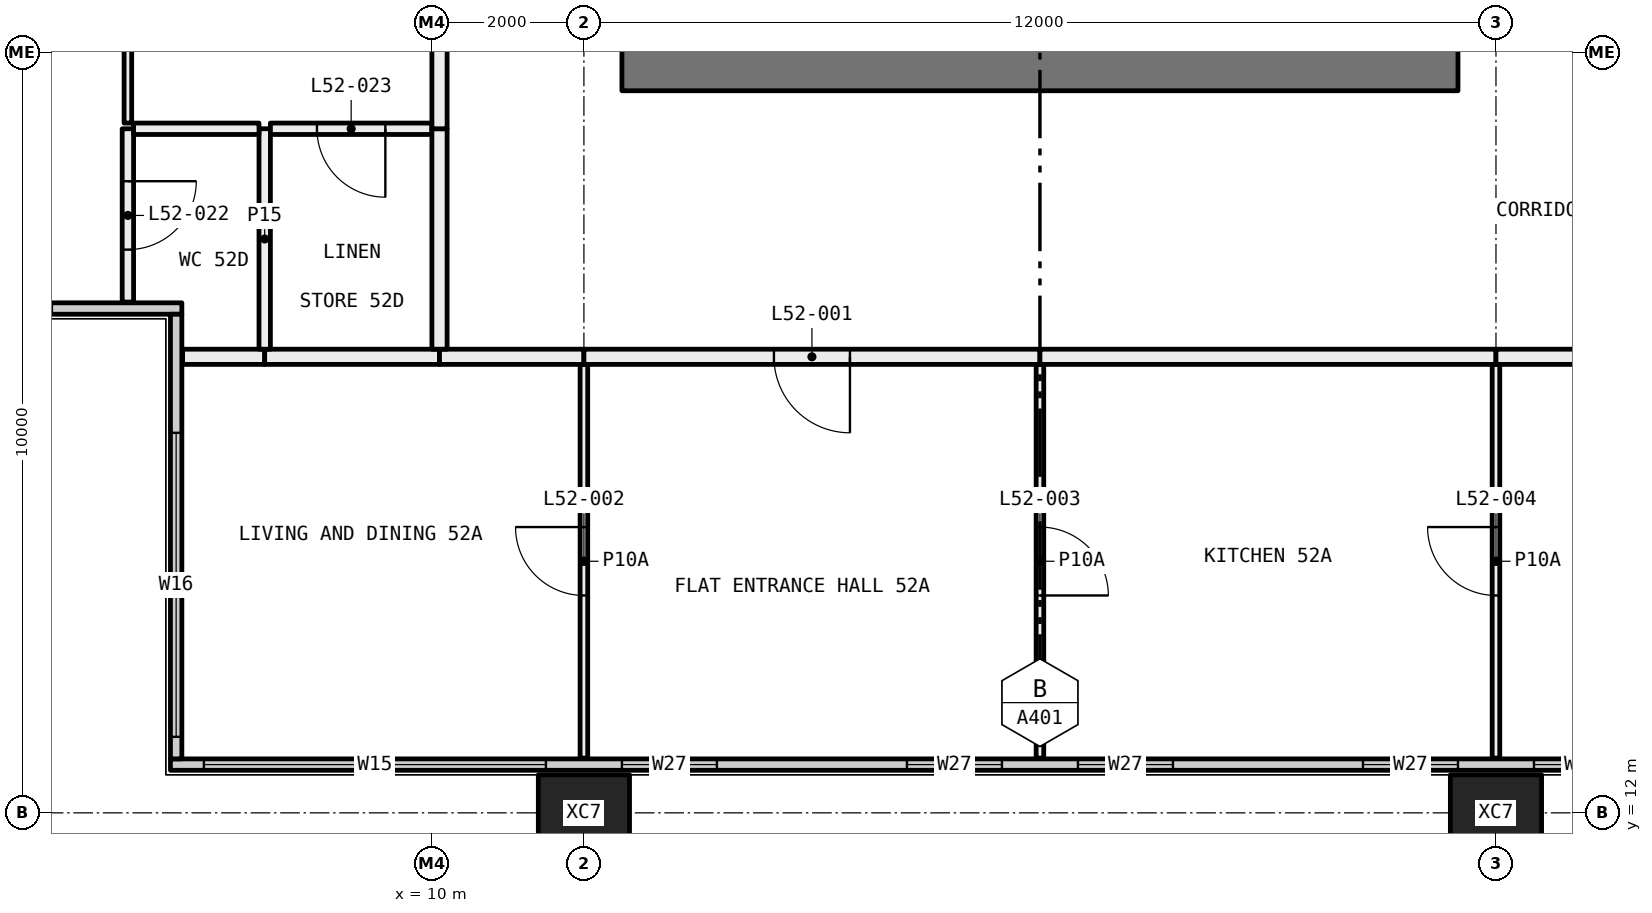
"""IFC4 building model, lengths in metres.
Left out: names, types, materials, properties, quantities, classifications, styles, units other than length and angle.
Written with IfcOpenShell. Run it as: python <this file> out.ifc"""

import sys

from ifc_helpers import new_model, si_unit, direction, frame, frame_2d, origin, origin_2d, place, context, subcontext, project, spatial, rectangle, hollow_rectangle, extrude, element, fill, save


model = new_model("IFC4")
c1 = context("Model", 3, precision=1e-05, world=origin(), true_north=direction((0.0, 1.0)))
c2 = subcontext(c1, "Body", "Model", "MODEL_VIEW")
j1 = project(units=[si_unit("LENGTHUNIT", "METRE"), si_unit("PLANEANGLEUNIT", "RADIAN")], contexts=[c1])
p1 = place(None, origin())
s1 = spatial("IfcSite", under=j1, at=p1, CompositionType="ELEMENT")
p2 = place(p1, origin())
s2 = spatial("IfcBuilding", under=s1, at=p2, CompositionType="ELEMENT")
p3 = place(p2, frame((0.0, 0.0, 196.2)))
s3 = spatial("IfcBuildingStorey", under=s2, at=p3, CompositionType="ELEMENT", Elevation=196.2)
for number, where, z_axis, x_axis in (
    (1, (12.0, 12.0, -0.4), (0.0, 0.0, 1.0), (1.0, 0.0, 0.0)),
    (2, (24.0, 12.0, -0.4), (0.0, 0.0, 1.0), (1.0, 0.0, 0.0)),
):
    element("IfcColumn", number, at=place(p3, frame(where, z_axis=z_axis, x_axis=x_axis)), inside=s3, PredefinedType="COLUMN", context=c2, shape_type="SweptSolid", body=[
        extrude(hollow_rectangle(XDim=1.2, YDim=1.0, WallThickness=0.045, at=origin_2d()), origin(), (0.0, 0.0, 1.0), 3.45),
    ])
p4 = place(p3, frame((6.56, 12.635, 0.0), z_axis=(0.0, 0.0, 1.0), x_axis=(1.0, 0.0, 0.0)))
e3 = element("IfcWall", 3, at=p4, inside=s3, PredefinedType="ELEMENTEDWALL", context=c2, shape_type="SweptSolid", body=[
    extrude(rectangle(XDim=46.88, YDim=0.15, at=frame_2d((23.44, 0.0))), origin(), (0.0, 0.0, 1.0), 3.05),
])
p5 = place(p4, frame((0.44, 0.0, 0.45)))
e4 = element("IfcOpeningElement", 4, at=p5, cuts=e3, PredefinedType="OPENING", context=c2, shape_type="SweptSolid", body=[
    extrude(rectangle(XDim=4.5, YDim=2.55, at=frame_2d((2.25, 1.275))), frame((0.0, 0.085, 0.0), z_axis=(0.0, -1.0, 0.0), x_axis=(1.0, 0.0, 0.0)), (0.0, 0.0, 1.0), 0.17),
])
p6 = place(p4, frame((5.94, 0.0, 0.45)))
e5 = element("IfcOpeningElement", 5, at=p6, cuts=e3, PredefinedType="OPENING", context=c2, shape_type="SweptSolid", body=[
    extrude(rectangle(XDim=1.25, YDim=2.55, at=frame_2d((0.625, 1.275))), frame((0.0, 0.085, 0.0), z_axis=(0.0, -1.0, 0.0), x_axis=(1.0, 0.0, 0.0)), (0.0, 0.0, 1.0), 0.17),
])
p7 = place(p4, frame((9.69, 0.0, 0.45)))
e6 = element("IfcOpeningElement", 6, at=p7, cuts=e3, PredefinedType="OPENING", context=c2, shape_type="SweptSolid", body=[
    extrude(rectangle(XDim=1.25, YDim=2.55, at=frame_2d((0.625, 1.275))), frame((0.0, 0.085, 0.0), z_axis=(0.0, -1.0, 0.0), x_axis=(1.0, 0.0, 0.0)), (0.0, 0.0, 1.0), 0.17),
])
p8 = place(p4, frame((11.94, 0.0, 0.45)))
e7 = element("IfcOpeningElement", 7, at=p8, cuts=e3, PredefinedType="OPENING", context=c2, shape_type="SweptSolid", body=[
    extrude(rectangle(XDim=1.25, YDim=2.55, at=frame_2d((0.625, 1.275))), frame((0.0, 0.085, 0.0), z_axis=(0.0, -1.0, 0.0), x_axis=(1.0, 0.0, 0.0)), (0.0, 0.0, 1.0), 0.17),
])
p9 = place(p4, frame((15.69, 0.0, 0.45)))
e8 = element("IfcOpeningElement", 8, at=p9, cuts=e3, PredefinedType="OPENING", context=c2, shape_type="SweptSolid", body=[
    extrude(rectangle(XDim=1.25, YDim=2.55, at=frame_2d((0.625, 1.275))), frame((0.0, 0.085, 0.0), z_axis=(0.0, -1.0, 0.0), x_axis=(1.0, 0.0, 0.0)), (0.0, 0.0, 1.0), 0.17),
])
p10 = place(p4, frame((17.94, 0.0, 0.45)))
e9 = element("IfcOpeningElement", 9, at=p10, cuts=e3, PredefinedType="OPENING", context=c2, shape_type="SweptSolid", body=[
    extrude(rectangle(XDim=1.25, YDim=2.55, at=frame_2d((0.625, 1.275))), frame((0.0, 0.085, 0.0), z_axis=(0.0, -1.0, 0.0), x_axis=(1.0, 0.0, 0.0)), (0.0, 0.0, 1.0), 0.17),
])
p11 = place(p4, frame((21.69, 0.0, 0.45)))
e10 = element("IfcOpeningElement", 10, at=p11, cuts=e3, PredefinedType="OPENING", context=c2, shape_type="SweptSolid", body=[
    extrude(rectangle(XDim=1.25, YDim=2.55, at=frame_2d((0.625, 1.275))), frame((0.0, 0.085, 0.0), z_axis=(0.0, -1.0, 0.0), x_axis=(1.0, 0.0, 0.0)), (0.0, 0.0, 1.0), 0.17),
])
p12 = place(p4, frame((23.94, 0.0, 0.45)))
e11 = element("IfcOpeningElement", 11, at=p12, cuts=e3, PredefinedType="OPENING", context=c2, shape_type="SweptSolid", body=[
    extrude(rectangle(XDim=1.25, YDim=2.55, at=frame_2d((0.625, 1.275))), frame((0.0, 0.085, 0.0), z_axis=(0.0, -1.0, 0.0), x_axis=(1.0, 0.0, 0.0)), (0.0, 0.0, 1.0), 0.17),
])
p13 = place(p4, frame((27.69, 0.0, 0.45)))
e12 = element("IfcOpeningElement", 12, at=p13, cuts=e3, PredefinedType="OPENING", context=c2, shape_type="SweptSolid", body=[
    extrude(rectangle(XDim=1.25, YDim=2.55, at=frame_2d((0.625, 1.275))), frame((0.0, 0.085, 0.0), z_axis=(0.0, -1.0, 0.0), x_axis=(1.0, 0.0, 0.0)), (0.0, 0.0, 1.0), 0.17),
])
p14 = place(p4, frame((29.94, 0.0, 0.45)))
e13 = element("IfcOpeningElement", 13, at=p14, cuts=e3, PredefinedType="OPENING", context=c2, shape_type="SweptSolid", body=[
    extrude(rectangle(XDim=1.25, YDim=2.55, at=frame_2d((0.625, 1.275))), frame((0.0, 0.085, 0.0), z_axis=(0.0, -1.0, 0.0), x_axis=(1.0, 0.0, 0.0)), (0.0, 0.0, 1.0), 0.17),
])
p15 = place(p4, frame((33.69, 0.0, 0.45)))
e14 = element("IfcOpeningElement", 14, at=p15, cuts=e3, PredefinedType="OPENING", context=c2, shape_type="SweptSolid", body=[
    extrude(rectangle(XDim=1.25, YDim=2.55, at=frame_2d((0.625, 1.275))), frame((0.0, 0.085, 0.0), z_axis=(0.0, -1.0, 0.0), x_axis=(1.0, 0.0, 0.0)), (0.0, 0.0, 1.0), 0.17),
])
p16 = place(p4, frame((35.94, 0.0, 0.45)))
e15 = element("IfcOpeningElement", 15, at=p16, cuts=e3, PredefinedType="OPENING", context=c2, shape_type="SweptSolid", body=[
    extrude(rectangle(XDim=1.25, YDim=2.55, at=frame_2d((0.625, 1.275))), frame((0.0, 0.085, 0.0), z_axis=(0.0, -1.0, 0.0), x_axis=(1.0, 0.0, 0.0)), (0.0, 0.0, 1.0), 0.17),
])
p17 = place(p4, frame((39.69, 0.0, 0.45)))
e16 = element("IfcOpeningElement", 16, at=p17, cuts=e3, PredefinedType="OPENING", context=c2, shape_type="SweptSolid", body=[
    extrude(rectangle(XDim=1.25, YDim=2.55, at=frame_2d((0.625, 1.275))), frame((0.0, 0.085, 0.0), z_axis=(0.0, -1.0, 0.0), x_axis=(1.0, 0.0, 0.0)), (0.0, 0.0, 1.0), 0.17),
])
p18 = place(p4, frame((41.94, 0.0, 0.45)))
e17 = element("IfcOpeningElement", 17, at=p18, cuts=e3, PredefinedType="OPENING", context=c2, shape_type="SweptSolid", body=[
    extrude(rectangle(XDim=4.5, YDim=2.55, at=frame_2d((2.25, 1.275))), frame((0.0, 0.085, 0.0), z_axis=(0.0, -1.0, 0.0), x_axis=(1.0, 0.0, 0.0)), (0.0, 0.0, 1.0), 0.17),
])
p19 = place(p3, frame((0.56, 18.635, 0.0), z_axis=(0.0, 0.0, 1.0), x_axis=(1.0, 0.0, 0.0)))
e18 = element("IfcWall", 18, at=p19, inside=s3, PredefinedType="ELEMENTEDWALL", context=c2, shape_type="SweptSolid", body=[
    extrude(rectangle(XDim=6.15, YDim=0.15, at=frame_2d((3.075, 0.0))), origin(), (0.0, 0.0, 1.0), 3.05),
])
p20 = place(p19, frame((0.44, 0.0, 0.45)))
e19 = element("IfcOpeningElement", 19, at=p20, cuts=e18, PredefinedType="OPENING", context=c2, shape_type="SweptSolid", body=[
    extrude(rectangle(XDim=4.0, YDim=2.55, at=frame_2d((2.0, 1.275))), frame((0.0, 0.085, 0.0), z_axis=(0.0, -1.0, 0.0), x_axis=(1.0, 0.0, 0.0)), (0.0, 0.0, 1.0), 0.17),
])
p21 = place(p3, frame((6.635, 12.71, 0.0), z_axis=(0.0, 0.0, 1.0), x_axis=(0.0, 1.0, 0.0)))
e20 = element("IfcWall", 20, at=p21, inside=s3, PredefinedType="ELEMENTEDWALL", context=c2, shape_type="SweptSolid", body=[
    extrude(rectangle(XDim=5.85, YDim=0.15, at=frame_2d((2.925, 0.0))), origin(), (0.0, 0.0, 1.0), 3.05),
])
p22 = place(p21, frame((0.29, 0.0, 0.45)))
e21 = element("IfcOpeningElement", 21, at=p22, cuts=e20, PredefinedType="OPENING", context=c2, shape_type="SweptSolid", body=[
    extrude(rectangle(XDim=4.0, YDim=2.55, at=frame_2d((2.0, 1.275))), frame((0.0, 0.085, 0.0), z_axis=(0.0, -1.0, 0.0), x_axis=(1.0, 0.0, 0.0)), (0.0, 0.0, 1.0), 0.17),
])
p23 = place(p3, frame((12.0, 12.72, 0.0), z_axis=(0.0, 0.0, 1.0), x_axis=(0.0, 1.0, 0.0)))
e22 = element("IfcWall", 22, at=p23, inside=s3, PredefinedType="PARTITIONING", context=c2, shape_type="SweptSolid", body=[
    extrude(rectangle(XDim=5.18, YDim=0.1, at=frame_2d((2.59, 0.0))), origin(), (0.0, 0.0, 1.0), 3.05),
])
p24 = place(p23, frame((2.14, 0.0, 0.0)))
e23 = element("IfcOpeningElement", 23, at=p24, cuts=e22, PredefinedType="OPENING", context=c2, shape_type="SweptSolid", body=[
    extrude(rectangle(XDim=0.9, YDim=2.1, at=frame_2d((0.45, 1.05))), frame((0.0, 0.06, 0.0), z_axis=(0.0, -1.0, 0.0), x_axis=(1.0, 0.0, 0.0)), (0.0, 0.0, 1.0), 0.12),
])
p25 = place(p3, frame((7.8, 18.0, 0.0), z_axis=(0.0, 0.0, 1.0), x_axis=(-1.0, 0.0, 0.0)))
e24 = element("IfcWall", 24, at=p25, inside=s3, PredefinedType="PARTITIONING", context=c2, shape_type="SweptSolid", body=[
    extrude(rectangle(XDim=1.08, YDim=0.2, at=frame_2d((0.54, 0.0))), origin(), (0.0, 0.0, 1.0), 3.05),
])
p26 = place(p3, frame((10.1, 18.0, 0.0), z_axis=(0.0, 0.0, 1.0), x_axis=(-1.0, 0.0, 0.0)))
e25 = element("IfcWall", 25, at=p26, inside=s3, PredefinedType="PARTITIONING", context=c2, shape_type="SweptSolid", body=[
    extrude(rectangle(XDim=2.3, YDim=0.2, at=frame_2d((1.15, 0.0))), origin(), (0.0, 0.0, 1.0), 3.05),
])
p27 = place(p3, frame((12.0, 18.0, 0.0), z_axis=(0.0, 0.0, 1.0), x_axis=(-1.0, 0.0, 0.0)))
e26 = element("IfcWall", 26, at=p27, inside=s3, PredefinedType="PARTITIONING", context=c2, shape_type="SweptSolid", body=[
    extrude(rectangle(XDim=1.9, YDim=0.2, at=frame_2d((0.95, 0.0))), origin(), (0.0, 0.0, 1.0), 3.05),
])
p28 = place(p3, frame((18.0, 12.72, 0.0), z_axis=(0.0, 0.0, 1.0), x_axis=(0.0, 1.0, 0.0)))
e27 = element("IfcWall", 27, at=p28, inside=s3, PredefinedType="PARTITIONING", context=c2, shape_type="SweptSolid", body=[
    extrude(rectangle(XDim=5.18, YDim=0.1, at=frame_2d((2.59, 0.0))), origin(), (0.0, 0.0, 1.0), 3.05),
])
p29 = place(p28, frame((2.14, 0.0, 0.0)))
e28 = element("IfcOpeningElement", 28, at=p29, cuts=e27, PredefinedType="OPENING", context=c2, shape_type="SweptSolid", body=[
    extrude(rectangle(XDim=0.9, YDim=2.1, at=frame_2d((0.45, 1.05))), frame((0.0, 0.06, 0.0), z_axis=(0.0, -1.0, 0.0), x_axis=(1.0, 0.0, 0.0)), (0.0, 0.0, 1.0), 0.12),
])
p30 = place(p3, frame((18.0, 18.0, 0.0), z_axis=(0.0, 0.0, 1.0), x_axis=(-1.0, 0.0, 0.0)))
e29 = element("IfcWall", 29, at=p30, inside=s3, PredefinedType="PARTITIONING", context=c2, shape_type="SweptSolid", body=[
    extrude(rectangle(XDim=6.0, YDim=0.2, at=frame_2d((3.0, 0.0))), origin(), (0.0, 0.0, 1.0), 3.05),
])
p31 = place(p30, frame((2.5, 0.0, 0.0)))
e30 = element("IfcOpeningElement", 30, at=p31, cuts=e29, PredefinedType="OPENING", context=c2, shape_type="SweptSolid", body=[
    extrude(rectangle(XDim=1.0, YDim=2.1, at=frame_2d((0.5, 1.05))), frame((0.0, 0.11, 0.0), z_axis=(0.0, -1.0, 0.0), x_axis=(1.0, 0.0, 0.0)), (0.0, 0.0, 1.0), 0.22),
])
p32 = place(p3, frame((24.0, 12.72, 0.0), z_axis=(0.0, 0.0, 1.0), x_axis=(0.0, 1.0, 0.0)))
e31 = element("IfcWall", 31, at=p32, inside=s3, PredefinedType="PARTITIONING", context=c2, shape_type="SweptSolid", body=[
    extrude(rectangle(XDim=5.18, YDim=0.1, at=frame_2d((2.59, 0.0))), origin(), (0.0, 0.0, 1.0), 3.05),
])
p33 = place(p32, frame((2.14, 0.0, 0.0)))
e32 = element("IfcOpeningElement", 32, at=p33, cuts=e31, PredefinedType="OPENING", context=c2, shape_type="SweptSolid", body=[
    extrude(rectangle(XDim=0.9, YDim=2.1, at=frame_2d((0.45, 1.05))), frame((0.0, 0.06, 0.0), z_axis=(0.0, -1.0, 0.0), x_axis=(1.0, 0.0, 0.0)), (0.0, 0.0, 1.0), 0.12),
])
for number, where, z_axis, x_axis in (
    (33, (24.0, 18.0, 0.0), (0.0, 0.0, 1.0), (-1.0, 0.0, 0.0)),
    (34, (30.0, 18.0, 0.0), (0.0, 0.0, 1.0), (-1.0, 0.0, 0.0)),
):
    element("IfcWall", number, at=place(p3, frame(where, z_axis=z_axis, x_axis=x_axis)), inside=s3, PredefinedType="PARTITIONING", context=c2, shape_type="SweptSolid", body=[
        extrude(rectangle(XDim=6.0, YDim=0.2, at=frame_2d((3.0, 0.0))), origin(), (0.0, 0.0, 1.0), 3.05),
    ])
p34 = place(p3, frame((6.0, 18.72, 0.0), z_axis=(0.0, 0.0, 1.0), x_axis=(0.0, 1.0, 0.0)))
e35 = element("IfcWall", 35, at=p34, inside=s3, PredefinedType="PARTITIONING", context=c2, shape_type="SweptSolid", body=[
    extrude(rectangle(XDim=2.28, YDim=0.15, at=frame_2d((1.14, 0.0))), origin(), (0.0, 0.0, 1.0), 3.05),
])
p35 = place(p34, frame((0.69, 0.0, 0.0)))
e36 = element("IfcOpeningElement", 36, at=p35, cuts=e35, PredefinedType="OPENING", context=c2, shape_type="SweptSolid", body=[
    extrude(rectangle(XDim=0.9, YDim=2.1, at=frame_2d((0.45, 1.05))), frame((0.0, 0.085, 0.0), z_axis=(0.0, -1.0, 0.0), x_axis=(1.0, 0.0, 0.0)), (0.0, 0.0, 1.0), 0.17),
])
p36 = place(p3, frame((6.0, 21.075, 0.0), z_axis=(0.0, 0.0, 1.0), x_axis=(0.0, 1.0, 0.0)))
e37 = element("IfcWall", 37, at=p36, inside=s3, PredefinedType="PARTITIONING", context=c2, shape_type="SweptSolid", body=[
    extrude(rectangle(XDim=2.875, YDim=0.1, at=frame_2d((1.438, 0.0))), origin(), (0.0, 0.0, 1.0), 2.45),
])
p37 = place(p3, frame((7.8, 18.1, 0.0), z_axis=(0.0, 0.0, 1.0), x_axis=(0.0, 1.0, 0.0)))
e38 = element("IfcWall", 38, at=p37, inside=s3, PredefinedType="PARTITIONING", context=c2, shape_type="SweptSolid", body=[
    extrude(rectangle(XDim=2.9, YDim=0.15, at=frame_2d((1.45, 0.0))), origin(), (0.0, 0.0, 1.0), 3.05),
])
p38 = place(p3, frame((7.725, 21.0, 0.0), z_axis=(0.0, 0.0, 1.0), x_axis=(-1.0, 0.0, 0.0)))
e39 = element("IfcWall", 39, at=p38, inside=s3, PredefinedType="PARTITIONING", context=c2, shape_type="SweptSolid", body=[
    extrude(rectangle(XDim=1.65, YDim=0.15, at=frame_2d((0.825, 0.0))), origin(), (0.0, 0.0, 1.0), 3.05),
])
p39 = place(p3, frame((10.0, 21.0, 0.0), z_axis=(0.0, 0.0, 1.0), x_axis=(-1.0, 0.0, 0.0)))
e40 = element("IfcWall", 40, at=p39, inside=s3, PredefinedType="PARTITIONING", context=c2, shape_type="SweptSolid", body=[
    extrude(rectangle(XDim=2.125, YDim=0.15, at=frame_2d((1.062, 0.0))), origin(), (0.0, 0.0, 1.0), 3.05),
])
p40 = place(p39, frame((0.613, 0.0, 0.0)))
e41 = element("IfcOpeningElement", 41, at=p40, cuts=e40, PredefinedType="OPENING", context=c2, shape_type="SweptSolid", body=[
    extrude(rectangle(XDim=0.9, YDim=2.1, at=frame_2d((0.45, 1.05))), frame((0.0, 0.085, 0.0), z_axis=(0.0, -1.0, 0.0), x_axis=(1.0, 0.0, 0.0)), (0.0, 0.0, 1.0), 0.17),
])
p41 = place(p3, frame((10.1, 18.1, 0.0), z_axis=(0.0, 0.0, 1.0), x_axis=(0.0, 1.0, 0.0)))
e42 = element("IfcWall", 42, at=p41, inside=s3, PredefinedType="PARTITIONING", context=c2, shape_type="SweptSolid", body=[
    extrude(rectangle(XDim=2.9, YDim=0.2, at=frame_2d((1.45, 0.0))), origin(), (0.0, 0.0, 1.0), 3.05),
])
p42 = place(p3, frame((10.1, 21.0, 0.0), z_axis=(0.0, 0.0, 1.0), x_axis=(0.0, 1.0, 0.0)))
e43 = element("IfcWall", 43, at=p42, inside=s3, PredefinedType="PARTITIONING", context=c2, shape_type="SweptSolid", body=[
    extrude(rectangle(XDim=3.1, YDim=0.2, at=frame_2d((1.55, 0.0))), origin(), (0.0, 0.0, 1.0), 2.45),
])
p43 = place(p3, frame((12.5, 21.775, 0.0), z_axis=(0.0, 0.0, 1.0), x_axis=(1.0, 0.0, 0.0)))
e44 = element("IfcWall", 44, at=p43, inside=s3, PredefinedType="SHEAR", context=c2, shape_type="SweptSolid", body=[
    extrude(rectangle(XDim=11.0, YDim=0.55, at=frame_2d((5.5, 0.0))), origin(), (0.0, 0.0, 1.0), 3.05),
])
p44 = place(p5, origin())
e45 = element("IfcWindow", 45, at=p44, inside=s3, PartitioningType="SINGLE_PANEL", PredefinedType="WINDOW", context=c2, shape_type="SweptSolid", body=[
    extrude(rectangle(XDim=4.5, YDim=2.55, at=frame_2d((2.25, 1.275))), frame((0.0, 0.03, 0.0), z_axis=(0.0, -1.0, 0.0), x_axis=(1.0, 0.0, 0.0)), (0.0, 0.0, 1.0), 0.06),
])
fill(e4, e45)
p45 = place(p6, origin())
e46 = element("IfcWindow", 46, at=p45, inside=s3, PartitioningType="SINGLE_PANEL", PredefinedType="WINDOW", context=c2, shape_type="SweptSolid", body=[
    extrude(rectangle(XDim=1.25, YDim=2.55, at=frame_2d((0.625, 1.275))), frame((0.0, 0.03, 0.0), z_axis=(0.0, -1.0, 0.0), x_axis=(1.0, 0.0, 0.0)), (0.0, 0.0, 1.0), 0.06),
])
fill(e5, e46)
p46 = place(p7, origin())
e47 = element("IfcWindow", 47, at=p46, inside=s3, PartitioningType="SINGLE_PANEL", PredefinedType="WINDOW", context=c2, shape_type="SweptSolid", body=[
    extrude(rectangle(XDim=1.25, YDim=2.55, at=frame_2d((0.625, 1.275))), frame((0.0, 0.03, 0.0), z_axis=(0.0, -1.0, 0.0), x_axis=(1.0, 0.0, 0.0)), (0.0, 0.0, 1.0), 0.06),
])
fill(e6, e47)
p47 = place(p8, origin())
e48 = element("IfcWindow", 48, at=p47, inside=s3, PartitioningType="SINGLE_PANEL", PredefinedType="WINDOW", context=c2, shape_type="SweptSolid", body=[
    extrude(rectangle(XDim=1.25, YDim=2.55, at=frame_2d((0.625, 1.275))), frame((0.0, 0.03, 0.0), z_axis=(0.0, -1.0, 0.0), x_axis=(1.0, 0.0, 0.0)), (0.0, 0.0, 1.0), 0.06),
])
fill(e7, e48)
p48 = place(p9, origin())
e49 = element("IfcWindow", 49, at=p48, inside=s3, PartitioningType="SINGLE_PANEL", PredefinedType="WINDOW", context=c2, shape_type="SweptSolid", body=[
    extrude(rectangle(XDim=1.25, YDim=2.55, at=frame_2d((0.625, 1.275))), frame((0.0, 0.03, 0.0), z_axis=(0.0, -1.0, 0.0), x_axis=(1.0, 0.0, 0.0)), (0.0, 0.0, 1.0), 0.06),
])
fill(e8, e49)
p49 = place(p10, origin())
e50 = element("IfcWindow", 50, at=p49, inside=s3, PartitioningType="SINGLE_PANEL", PredefinedType="WINDOW", context=c2, shape_type="SweptSolid", body=[
    extrude(rectangle(XDim=1.25, YDim=2.55, at=frame_2d((0.625, 1.275))), frame((0.0, 0.03, 0.0), z_axis=(0.0, -1.0, 0.0), x_axis=(1.0, 0.0, 0.0)), (0.0, 0.0, 1.0), 0.06),
])
fill(e9, e50)
p50 = place(p22, origin())
e51 = element("IfcWindow", 51, at=p50, inside=s3, PartitioningType="SINGLE_PANEL", PredefinedType="WINDOW", context=c2, shape_type="SweptSolid", body=[
    extrude(rectangle(XDim=4.0, YDim=2.55, at=frame_2d((2.0, 1.275))), frame((0.0, 0.03, 0.0), z_axis=(0.0, -1.0, 0.0), x_axis=(1.0, 0.0, 0.0)), (0.0, 0.0, 1.0), 0.06),
])
fill(e21, e51)
p51 = place(p31, origin())
e52 = element("IfcDoor", 52, at=p51, inside=s3, OperationType="SINGLE_SWING_RIGHT", PredefinedType="DOOR", context=c2, shape_type="SweptSolid", body=[
    extrude(rectangle(XDim=1.0, YDim=2.1, at=frame_2d((0.5, 1.05))), frame((0.0, 0.025, 0.0), z_axis=(0.0, -1.0, 0.0), x_axis=(1.0, 0.0, 0.0)), (0.0, 0.0, 1.0), 0.05),
])
fill(e30, e52)
p52 = place(p24, origin())
e53 = element("IfcDoor", 53, at=p52, inside=s3, OperationType="SINGLE_SWING_LEFT", PredefinedType="DOOR", context=c2, shape_type="SweptSolid", body=[
    extrude(rectangle(XDim=0.9, YDim=2.1, at=frame_2d((0.45, 1.05))), frame((0.0, 0.025, 0.0), z_axis=(0.0, -1.0, 0.0), x_axis=(1.0, 0.0, 0.0)), (0.0, 0.0, 1.0), 0.05),
])
fill(e23, e53)
p53 = place(p29, frame((0.9, 0.0, 0.0), x_axis=(-1.0, 0.0, 0.0)))
e54 = element("IfcDoor", 54, at=p53, inside=s3, OperationType="SINGLE_SWING_LEFT", PredefinedType="DOOR", context=c2, shape_type="SweptSolid", body=[
    extrude(rectangle(XDim=0.9, YDim=2.1, at=frame_2d((0.45, 1.05))), frame((0.0, 0.025, 0.0), z_axis=(0.0, -1.0, 0.0), x_axis=(1.0, 0.0, 0.0)), (0.0, 0.0, 1.0), 0.05),
])
fill(e28, e54)
p54 = place(p33, origin())
e55 = element("IfcDoor", 55, at=p54, inside=s3, OperationType="SINGLE_SWING_LEFT", PredefinedType="DOOR", context=c2, shape_type="SweptSolid", body=[
    extrude(rectangle(XDim=0.9, YDim=2.1, at=frame_2d((0.45, 1.05))), frame((0.0, 0.025, 0.0), z_axis=(0.0, -1.0, 0.0), x_axis=(1.0, 0.0, 0.0)), (0.0, 0.0, 1.0), 0.05),
])
fill(e32, e55)
p55 = place(p35, frame((0.9, 0.0, 0.0), x_axis=(-1.0, 0.0, 0.0)))
e56 = element("IfcDoor", 56, at=p55, inside=s3, OperationType="SINGLE_SWING_RIGHT", PredefinedType="DOOR", context=c2, shape_type="SweptSolid", body=[
    extrude(rectangle(XDim=0.9, YDim=2.1, at=frame_2d((0.45, 1.05))), frame((0.0, 0.025, 0.0), z_axis=(0.0, -1.0, 0.0), x_axis=(1.0, 0.0, 0.0)), (0.0, 0.0, 1.0), 0.05),
])
fill(e36, e56)
p56 = place(p40, origin())
e57 = element("IfcDoor", 57, at=p56, inside=s3, OperationType="SINGLE_SWING_RIGHT", PredefinedType="DOOR", context=c2, shape_type="SweptSolid", body=[
    extrude(rectangle(XDim=0.9, YDim=2.1, at=frame_2d((0.45, 1.05))), frame((0.0, 0.025, 0.0), z_axis=(0.0, -1.0, 0.0), x_axis=(1.0, 0.0, 0.0)), (0.0, 0.0, 1.0), 0.05),
])
fill(e41, e57)
save(model, sys.argv[1])
